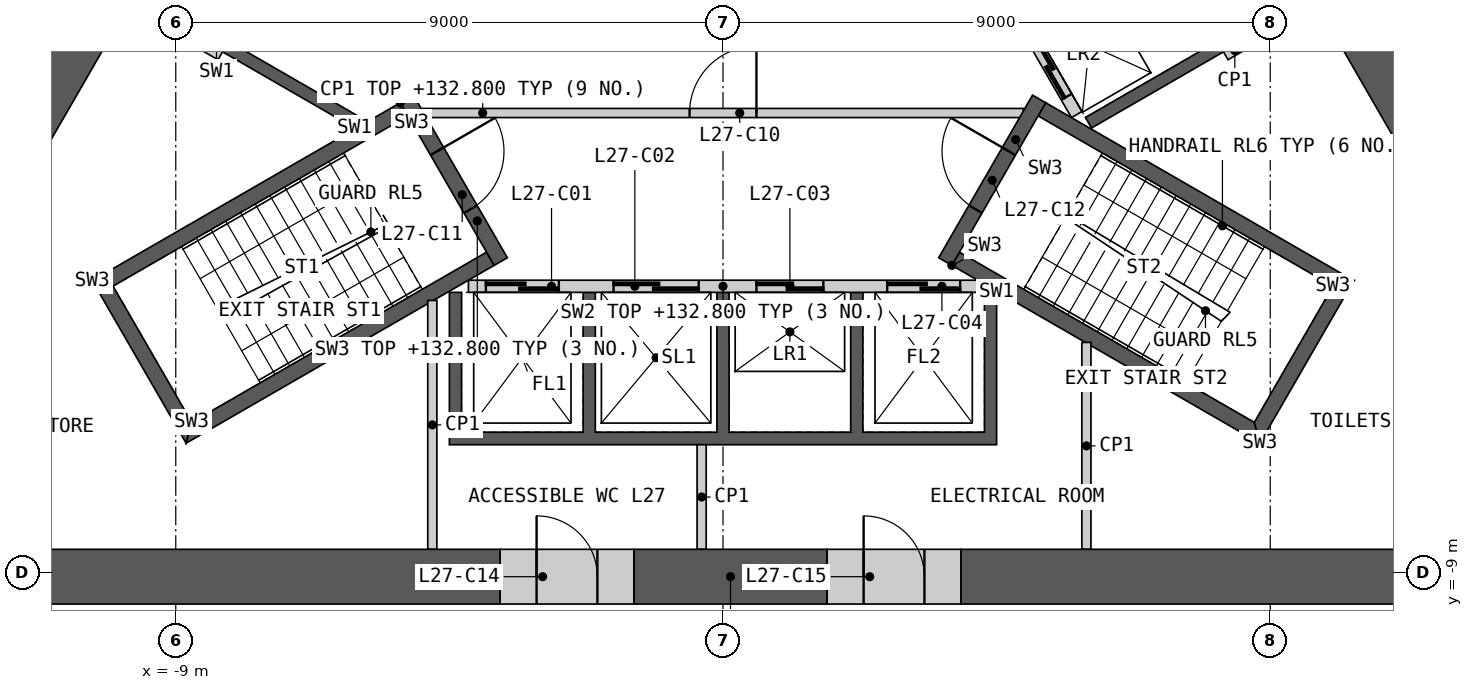
"""IFC4 building model, lengths in metres.
Left out: names, types, materials, properties, quantities, classifications, styles, units other than length and angle.
Written with IfcOpenShell. Run it as: python <this file> out.ifc"""

import sys

from ifc_helpers import new_model, si_unit, direction, frame, frame_2d, origin, place, context, subcontext, project, spatial, polyline, rectangle, outline, extrude, element, fill, save


model = new_model("IFC4")
c1 = context("Model", 3, precision=1e-05, world=origin(), true_north=direction((0.0, 1.0)))
c2 = subcontext(c1, "Body", "Model", "MODEL_VIEW")
j1 = project(units=[si_unit("LENGTHUNIT", "METRE"), si_unit("PLANEANGLEUNIT", "RADIAN")], contexts=[c1])
p1 = place(None, origin())
s1 = spatial("IfcSite", under=j1, at=p1, CompositionType="ELEMENT")
p2 = place(p1, origin())
s2 = spatial("IfcBuilding", under=s1, at=p2, CompositionType="ELEMENT")
p3 = place(p2, frame((0.0, 0.0, 129.0)))
s3 = spatial("IfcBuildingStorey", under=s2, at=p3, CompositionType="ELEMENT", Elevation=129.0)
p4 = place(p3, origin())
e1 = element("IfcWall", 1, at=p4, inside=s3, PredefinedType="SHEAR", context=c2, shape_type="SweptSolid", body=[
    extrude(outline(polyline([(4.5, -4.4), (4.5, -6.906), (-4.5, -6.906), (-4.5, -4.4), (-4.3, -4.4), (-4.3, -6.7), (-2.3, -6.7), (-2.3, -4.4), (-2.1, -4.4), (-2.1, -6.7), (-0.1, -6.7), (-0.1, -4.4), (0.1, -4.4), (0.1, -6.7), (2.1, -6.7), (2.1, -4.4), (2.3, -4.4), (2.3, -6.7), (4.3, -6.7), (4.3, -4.4), (4.5, -4.4)])), origin(), (0.0, 0.0, 1.0), 3.8),
])
p5 = place(p3, frame((-4.187, -4.3, 0.0), z_axis=(0.0, 0.0, 1.0), x_axis=(1.0, 0.0, 0.0)))
e2 = element("IfcWall", 2, at=p5, inside=s3, PredefinedType="SOLIDWALL", context=c2, shape_type="SweptSolid", body=[
    extrude(rectangle(XDim=8.373, YDim=0.2, at=frame_2d((4.187, 0.0))), origin(), (0.0, 0.0, 1.0), 3.8),
])
p6 = place(p5, frame((0.287, 0.0, 0.0)))
e3 = element("IfcOpeningElement", 3, at=p6, cuts=e2, PredefinedType="OPENING", context=c2, shape_type="SweptSolid", body=[
    extrude(rectangle(XDim=1.2, YDim=2.1, at=frame_2d((0.6, 1.05))), frame((0.0, 0.11, 0.0), z_axis=(0.0, -1.0, 0.0), x_axis=(1.0, 0.0, 0.0)), (0.0, 0.0, 1.0), 0.22),
])
p7 = place(p5, frame((2.387, 0.0, 0.0)))
e4 = element("IfcOpeningElement", 4, at=p7, cuts=e2, PredefinedType="OPENING", context=c2, shape_type="SweptSolid", body=[
    extrude(rectangle(XDim=1.4, YDim=2.1, at=frame_2d((0.7, 1.05))), frame((0.0, 0.11, 0.0), z_axis=(0.0, -1.0, 0.0), x_axis=(1.0, 0.0, 0.0)), (0.0, 0.0, 1.0), 0.22),
])
p8 = place(p5, frame((4.737, 0.0, 0.0)))
e5 = element("IfcOpeningElement", 5, at=p8, cuts=e2, PredefinedType="OPENING", context=c2, shape_type="SweptSolid", body=[
    extrude(rectangle(XDim=1.1, YDim=2.1, at=frame_2d((0.55, 1.05))), frame((0.0, 0.11, 0.0), z_axis=(0.0, -1.0, 0.0), x_axis=(1.0, 0.0, 0.0)), (0.0, 0.0, 1.0), 0.22),
])
p9 = place(p5, frame((6.887, 0.0, 0.0)))
e6 = element("IfcOpeningElement", 6, at=p9, cuts=e2, PredefinedType="OPENING", context=c2, shape_type="SweptSolid", body=[
    extrude(rectangle(XDim=1.2, YDim=2.1, at=frame_2d((0.6, 1.05))), frame((0.0, 0.11, 0.0), z_axis=(0.0, -1.0, 0.0), x_axis=(1.0, 0.0, 0.0)), (0.0, 0.0, 1.0), 0.22),
])
p10 = place(p3, origin())
e7 = element("IfcWall", 7, at=p10, inside=s3, PredefinedType="SHEAR", context=c2, shape_type="SweptSolid", body=[
    extrude(outline(polyline([(2.66, 4.192), (4.831, 5.445), (8.231, -0.444), (6.061, -1.697), (5.96, -1.524), (7.952, -0.374), (6.952, 1.358), (4.96, 0.208), (4.861, 0.381), (6.852, 1.531), (5.852, 3.263), (3.861, 2.113), (3.76, 2.287), (5.752, 3.437), (4.752, 5.169), (2.76, 4.019), (2.66, 4.192)])), origin(), (0.0, 0.0, 1.0), 3.8),
])
p11 = place(p3, frame((5.817, -1.476, 0.0), z_axis=(0.0, 0.0, 1.0), x_axis=(-0.500002616675, 0.866023893041, 0.0)))
e8 = element("IfcWall", 8, at=p11, inside=s3, PredefinedType="SOLIDWALL", context=c2, shape_type="SweptSolid", body=[
    extrude(rectangle(XDim=8.373, YDim=0.2, at=frame_2d((4.187, 0.0))), origin(), (0.0, 0.0, 1.0), 3.8),
])
p12 = place(p11, frame((0.337, 0.0, 0.0)))
e9 = element("IfcOpeningElement", 9, at=p12, cuts=e8, PredefinedType="OPENING", context=c2, shape_type="SweptSolid", body=[
    extrude(rectangle(XDim=1.1, YDim=2.1, at=frame_2d((0.55, 1.05))), frame((0.0, 0.11, 0.0), z_axis=(0.0, -1.0, 0.0), x_axis=(1.0, 0.0, 0.0)), (0.0, 0.0, 1.0), 0.22),
])
p13 = place(p11, frame((2.537, 0.0, 0.0)))
e10 = element("IfcOpeningElement", 10, at=p13, cuts=e8, PredefinedType="OPENING", context=c2, shape_type="SweptSolid", body=[
    extrude(rectangle(XDim=1.1, YDim=2.1, at=frame_2d((0.55, 1.05))), frame((0.0, 0.11, 0.0), z_axis=(0.0, -1.0, 0.0), x_axis=(1.0, 0.0, 0.0)), (0.0, 0.0, 1.0), 0.22),
])
p14 = place(p11, frame((4.737, 0.0, 0.0)))
e11 = element("IfcOpeningElement", 11, at=p14, cuts=e8, PredefinedType="OPENING", context=c2, shape_type="SweptSolid", body=[
    extrude(rectangle(XDim=1.1, YDim=2.1, at=frame_2d((0.55, 1.05))), frame((0.0, 0.11, 0.0), z_axis=(0.0, -1.0, 0.0), x_axis=(1.0, 0.0, 0.0)), (0.0, 0.0, 1.0), 0.22),
])
p15 = place(p11, frame((7.037, 0.0, 0.0)))
e12 = element("IfcOpeningElement", 12, at=p15, cuts=e8, PredefinedType="OPENING", context=c2, shape_type="SweptSolid", body=[
    extrude(rectangle(XDim=0.9, YDim=2.1, at=frame_2d((0.45, 1.05))), frame((0.0, 0.11, 0.0), z_axis=(0.0, -1.0, 0.0), x_axis=(1.0, 0.0, 0.0)), (0.0, 0.0, 1.0), 0.22),
])
p16 = place(p3, origin())
e13 = element("IfcWall", 13, at=p16, inside=s3, PredefinedType="SHEAR", context=c2, shape_type="SweptSolid", body=[
    extrude(outline(polyline([(-6.061, -1.697), (-8.231, -0.444), (-8.131, -0.271), (-5.96, -1.524), (-6.061, -1.697)])), origin(), (0.0, 0.0, 1.0), 3.8),
])
p17 = place(p3, frame((-4.941, -1.45, 0.0), z_axis=(0.0, 0.0, 1.0), x_axis=(1.0, 0.0, 0.0)))
e14 = element("IfcWall", 14, at=p17, inside=s3, PredefinedType="PARTITIONING", context=c2, shape_type="SweptSolid", body=[
    extrude(rectangle(XDim=9.882, YDim=0.15, at=frame_2d((4.941, 0.0))), origin(), (0.0, 0.0, 1.0), 3.8),
])
p18 = place(p17, frame((4.391, 0.0, 0.0)))
e15 = element("IfcOpeningElement", 15, at=p18, cuts=e14, PredefinedType="OPENING", context=c2, shape_type="SweptSolid", body=[
    extrude(rectangle(XDim=1.1, YDim=2.1, at=frame_2d((0.55, 1.05))), frame((0.0, 0.085, 0.0), z_axis=(0.0, -1.0, 0.0), x_axis=(1.0, 0.0, 0.0)), (0.0, 0.0, 1.0), 0.17),
])
p19 = place(p3, origin())
e16 = element("IfcWall", 16, at=p19, inside=s3, PredefinedType="SHEAR", context=c2, shape_type="SweptSolid", body=[
    extrude(outline(polyline([(-5.307, -1.281), (-10.374, -4.206), (-10.032, -4.298), (-5.182, -1.498), (-5.307, -1.281)])), origin(), (0.0, 0.0, 1.0), 3.8),
])
p20 = place(p3, origin())
e17 = element("IfcWall", 17, at=p20, inside=s3, PredefinedType="SHEAR", context=c2, shape_type="SweptSolid", body=[
    extrude(outline(polyline([(-10.374, -4.206), (-8.83, -6.881), (-8.738, -6.539), (-10.032, -4.298), (-10.374, -4.206)])), origin(), (0.0, 0.0, 1.0), 3.8),
])
p21 = place(p3, origin())
e18 = element("IfcWall", 18, at=p21, inside=s3, PredefinedType="SHEAR", context=c2, shape_type="SweptSolid", body=[
    extrude(outline(polyline([(-8.738, -6.539), (-8.83, -6.881), (-3.763, -3.956), (-3.888, -3.739), (-8.738, -6.539)])), origin(), (0.0, 0.0, 1.0), 3.8),
])
p22 = place(p3, frame((-5.199, -1.219, 0.0), z_axis=(0.0, 0.0, 1.0), x_axis=(0.499982516597, -0.866035497597, 0.0)))
e19 = element("IfcWall", 19, at=p22, inside=s3, PredefinedType="SHEAR", context=c2, shape_type="SweptSolid", body=[
    extrude(rectangle(XDim=3.088, YDim=0.25, at=frame_2d((1.544, 0.0))), origin(), (0.0, 0.0, 1.0), 3.8),
])
p23 = place(p22, frame((0.994, 0.0, 0.0)))
e20 = element("IfcOpeningElement", 20, at=p23, cuts=e19, PredefinedType="OPENING", context=c2, shape_type="SweptSolid", body=[
    extrude(rectangle(XDim=1.1, YDim=2.1, at=frame_2d((0.55, 1.05))), frame((0.0, 0.135, 0.0), z_axis=(0.0, -1.0, 0.0), x_axis=(1.0, 0.0, 0.0)), (0.0, 0.0, 1.0), 0.27),
])
p24 = place(p3, origin())
e21 = element("IfcWall", 21, at=p24, inside=s3, PredefinedType="SHEAR", context=c2, shape_type="SweptSolid", body=[
    extrude(outline(polyline([(3.763, -3.956), (8.83, -6.881), (8.738, -6.539), (3.888, -3.739), (3.763, -3.956)])), origin(), (0.0, 0.0, 1.0), 3.8),
])
p25 = place(p3, origin())
e22 = element("IfcWall", 22, at=p25, inside=s3, PredefinedType="SHEAR", context=c2, shape_type="SweptSolid", body=[
    extrude(outline(polyline([(8.83, -6.881), (10.374, -4.206), (10.032, -4.298), (8.738, -6.539), (8.83, -6.881)])), origin(), (0.0, 0.0, 1.0), 3.8),
])
p26 = place(p3, origin())
e23 = element("IfcWall", 23, at=p26, inside=s3, PredefinedType="SHEAR", context=c2, shape_type="SweptSolid", body=[
    extrude(outline(polyline([(10.032, -4.298), (10.374, -4.206), (5.307, -1.281), (5.182, -1.498), (10.032, -4.298)])), origin(), (0.0, 0.0, 1.0), 3.8),
])
p27 = place(p3, frame((3.655, -3.893, 0.0), z_axis=(0.0, 0.0, 1.0), x_axis=(0.499982516597, 0.866035497597, 0.0)))
e24 = element("IfcWall", 24, at=p27, inside=s3, PredefinedType="SHEAR", context=c2, shape_type="SweptSolid", body=[
    extrude(rectangle(XDim=3.088, YDim=0.25, at=frame_2d((1.544, 0.0))), origin(), (0.0, 0.0, 1.0), 3.8),
])
p28 = place(p27, frame((0.994, 0.0, 0.0)))
e25 = element("IfcOpeningElement", 25, at=p28, cuts=e24, PredefinedType="OPENING", context=c2, shape_type="SweptSolid", body=[
    extrude(rectangle(XDim=1.1, YDim=2.1, at=frame_2d((0.55, 1.05))), frame((0.0, 0.135, 0.0), z_axis=(0.0, -1.0, 0.0), x_axis=(1.0, 0.0, 0.0)), (0.0, 0.0, 1.0), 0.27),
])
for number, where, z_axis, x_axis in (
    (26, (8.268, -0.509, 0.0), (0.0, 0.0, 1.0), (0.866, 0.5, 0.0)),
    (27, (-8.268, -0.509, 0.0), (0.0, 0.0, 1.0), (-0.866, 0.5, 0.0)),
):
    element("IfcWall", number, at=place(p3, frame(where, z_axis=z_axis, x_axis=x_axis)), inside=s3, PredefinedType="PARTITIONING", context=c2, shape_type="SweptSolid", body=[
        extrude(rectangle(XDim=1.72, YDim=0.15, at=frame_2d((0.86, 0.0))), origin(), (0.0, 0.0, 1.0), 3.8),
    ])
p29 = place(p3, frame((5.977, -8.626, 0.0), z_axis=(0.0, 0.0, 1.0), x_axis=(0.0, 1.0, 0.0)))
e28 = element("IfcWall", 28, at=p29, inside=s3, PredefinedType="PARTITIONING", context=c2, shape_type="SweptSolid", body=[
    extrude(rectangle(XDim=3.403, YDim=0.15, at=frame_2d((1.701, 0.0))), origin(), (0.0, 0.0, 1.0), 3.8),
])
p30 = place(p3, frame((-0.351, -8.626, 0.0), z_axis=(0.0, 0.0, 1.0), x_axis=(0.0, 1.0, 0.0)))
e29 = element("IfcWall", 29, at=p30, inside=s3, PredefinedType="PARTITIONING", context=c2, shape_type="SweptSolid", body=[
    extrude(rectangle(XDim=1.72, YDim=0.15, at=frame_2d((0.86, 0.0))), origin(), (0.0, 0.0, 1.0), 3.8),
])
p31 = place(p3, frame((-4.781, -8.626, 0.0), z_axis=(0.0, 0.0, 1.0), x_axis=(0.0, 1.0, 0.0)))
e30 = element("IfcWall", 30, at=p31, inside=s3, PredefinedType="PARTITIONING", context=c2, shape_type="SweptSolid", body=[
    extrude(rectangle(XDim=4.093, YDim=0.15, at=frame_2d((2.047, 0.0))), origin(), (0.0, 0.0, 1.0), 3.8),
])
p32 = place(p3, frame((-14.941, -9.076, 0.0), z_axis=(0.0, 0.0, 1.0), x_axis=(1.0, 0.0, 0.0)))
e31 = element("IfcWall", 31, at=p32, inside=s3, PredefinedType="SHEAR", context=c2, shape_type="SweptSolid", body=[
    extrude(rectangle(XDim=11.275, YDim=0.9, at=frame_2d((5.638, 0.0))), origin(), (0.0, 0.0, 1.0), 3.8),
])
p33 = place(p3, frame((3.913, -9.076, 0.0), z_axis=(0.0, 0.0, 1.0), x_axis=(1.0, 0.0, 0.0)))
e32 = element("IfcWall", 32, at=p33, inside=s3, PredefinedType="SHEAR", context=c2, shape_type="SweptSolid", body=[
    extrude(rectangle(XDim=11.029, YDim=0.9, at=frame_2d((5.514, 0.0))), origin(), (0.0, 0.0, 1.0), 3.8),
])
p34 = place(p3, frame((-1.466, -9.076, 0.0), z_axis=(0.0, 0.0, 1.0), x_axis=(1.0, 0.0, 0.0)))
e33 = element("IfcWall", 33, at=p34, inside=s3, PredefinedType="SHEAR", context=c2, shape_type="SweptSolid", body=[
    extrude(rectangle(XDim=3.179, YDim=0.9, at=frame_2d((1.589, 0.0))), origin(), (0.0, 0.0, 1.0), 3.8),
])
p35 = place(p3, frame((12.208, -2.992, 0.0), z_axis=(0.0, 0.0, 1.0), x_axis=(-0.499990106751, 0.866031115579, 0.0)))
e34 = element("IfcWall", 34, at=p35, inside=s3, PredefinedType="SHEAR", context=c2, shape_type="SweptSolid", body=[
    extrude(rectangle(XDim=6.396, YDim=0.9, at=frame_2d((3.198, 0.0))), origin(), (0.0, 0.0, 1.0), 3.8),
])
p36 = place(p3, frame((-10.06, 0.728, 0.0), z_axis=(0.0, 0.0, 1.0), x_axis=(-0.499996331799, -0.866027521611, 0.0)))
e35 = element("IfcWall", 35, at=p36, inside=s3, PredefinedType="SHEAR", context=c2, shape_type="SweptSolid", body=[
    extrude(rectangle(XDim=4.295, YDim=0.9, at=frame_2d((2.148, 0.0))), origin(), (0.0, 0.0, 1.0), 3.8),
])
p37 = place(p3, frame((-3.666, -9.076, 0.0), z_axis=(0.0, 0.0, 1.0), x_axis=(1.0, 0.0, 0.0)))
e36 = element("IfcWall", 36, at=p37, inside=s3, PredefinedType="SHEAR", context=c2, shape_type="SweptSolid", body=[
    extrude(rectangle(XDim=2.2, YDim=0.9, at=frame_2d((1.1, 0.0))), origin(), (0.0, 0.0, 1.0), 3.8),
])
p38 = place(p37, frame((0.6, 0.0, 0.0)))
e37 = element("IfcOpeningElement", 37, at=p38, cuts=e36, PredefinedType="OPENING", context=c2, shape_type="SweptSolid", body=[
    extrude(rectangle(XDim=1.0, YDim=2.1, at=frame_2d((0.5, 1.05))), frame((0.0, 0.46, 0.0), z_axis=(0.0, -1.0, 0.0), x_axis=(1.0, 0.0, 0.0)), (0.0, 0.0, 1.0), 0.92),
])
p39 = place(p3, frame((1.713, -9.076, 0.0), z_axis=(0.0, 0.0, 1.0), x_axis=(1.0, 0.0, 0.0)))
e38 = element("IfcWall", 38, at=p39, inside=s3, PredefinedType="SHEAR", context=c2, shape_type="SweptSolid", body=[
    extrude(rectangle(XDim=2.2, YDim=0.9, at=frame_2d((1.1, 0.0))), origin(), (0.0, 0.0, 1.0), 3.8),
])
p40 = place(p39, frame((0.6, 0.0, 0.0)))
e39 = element("IfcOpeningElement", 39, at=p40, cuts=e38, PredefinedType="OPENING", context=c2, shape_type="SweptSolid", body=[
    extrude(rectangle(XDim=1.0, YDim=2.1, at=frame_2d((0.5, 1.05))), frame((0.0, 0.46, 0.0), z_axis=(0.0, -1.0, 0.0), x_axis=(1.0, 0.0, 0.0)), (0.0, 0.0, 1.0), 0.92),
])
p41 = place(p3, frame((10.46, 5.736, 0.0), z_axis=(0.0, 0.0, 1.0), x_axis=(0.500004141693, -0.866023012564, 0.0)))
e40 = element("IfcWall", 40, at=p41, inside=s3, PredefinedType="PARTITIONING", context=c2, shape_type="SweptSolid", body=[
    extrude(rectangle(XDim=9.803, YDim=0.2, at=frame_2d((4.902, 0.0))), origin(), (0.0, 0.0, 1.0), 3.8),
])
p42 = place(p41, frame((4.352, 0.0, 0.0)))
e41 = element("IfcOpeningElement", 41, at=p42, cuts=e40, PredefinedType="OPENING", context=c2, shape_type="SweptSolid", body=[
    extrude(rectangle(XDim=1.0, YDim=2.1, at=frame_2d((0.5, 1.05))), frame((0.0, 0.11, 0.0), z_axis=(0.0, -1.0, 0.0), x_axis=(1.0, 0.0, 0.0)), (0.0, 0.0, 1.0), 0.22),
])
p43 = place(p3, frame((-15.361, -2.754, 0.0), z_axis=(0.0, 0.0, 1.0), x_axis=(0.500004141693, 0.866023012564, 0.0)))
e42 = element("IfcWall", 42, at=p43, inside=s3, PredefinedType="PARTITIONING", context=c2, shape_type="SweptSolid", body=[
    extrude(rectangle(XDim=9.803, YDim=0.2, at=frame_2d((4.902, 0.0))), origin(), (0.0, 0.0, 1.0), 3.8),
])
p44 = place(p43, frame((4.452, 0.0, 0.0)))
e43 = element("IfcOpeningElement", 43, at=p44, cuts=e42, PredefinedType="OPENING", context=c2, shape_type="SweptSolid", body=[
    extrude(rectangle(XDim=1.0, YDim=2.1, at=frame_2d((0.5, 1.05))), frame((0.0, 0.11, 0.0), z_axis=(0.0, -1.0, 0.0), x_axis=(1.0, 0.0, 0.0)), (0.0, 0.0, 1.0), 0.22),
])
p45 = place(p6, origin())
e44 = element("IfcDoor", 44, at=p45, inside=s3, OperationType="SLIDING_TO_LEFT", PredefinedType="DOOR", context=c2, shape_type="SweptSolid", body=[
    extrude(rectangle(XDim=1.2, YDim=2.1, at=frame_2d((0.6, 1.05))), frame((0.0, 0.025, 0.0), z_axis=(0.0, -1.0, 0.0), x_axis=(1.0, 0.0, 0.0)), (0.0, 0.0, 1.0), 0.05),
])
fill(e3, e44)
p46 = place(p7, origin())
e45 = element("IfcDoor", 45, at=p46, inside=s3, OperationType="SLIDING_TO_LEFT", PredefinedType="DOOR", context=c2, shape_type="SweptSolid", body=[
    extrude(rectangle(XDim=1.4, YDim=2.1, at=frame_2d((0.7, 1.05))), frame((0.0, 0.025, 0.0), z_axis=(0.0, -1.0, 0.0), x_axis=(1.0, 0.0, 0.0)), (0.0, 0.0, 1.0), 0.05),
])
fill(e4, e45)
p47 = place(p8, origin())
e46 = element("IfcDoor", 46, at=p47, inside=s3, OperationType="SLIDING_TO_LEFT", PredefinedType="DOOR", context=c2, shape_type="SweptSolid", body=[
    extrude(rectangle(XDim=1.1, YDim=2.1, at=frame_2d((0.55, 1.05))), frame((0.0, 0.025, 0.0), z_axis=(0.0, -1.0, 0.0), x_axis=(1.0, 0.0, 0.0)), (0.0, 0.0, 1.0), 0.05),
])
fill(e5, e46)
p48 = place(p9, origin())
e47 = element("IfcDoor", 47, at=p48, inside=s3, OperationType="SLIDING_TO_LEFT", PredefinedType="DOOR", context=c2, shape_type="SweptSolid", body=[
    extrude(rectangle(XDim=1.2, YDim=2.1, at=frame_2d((0.6, 1.05))), frame((0.0, 0.025, 0.0), z_axis=(0.0, -1.0, 0.0), x_axis=(1.0, 0.0, 0.0)), (0.0, 0.0, 1.0), 0.05),
])
fill(e6, e47)
p49 = place(p12, origin())
e48 = element("IfcDoor", 48, at=p49, inside=s3, OperationType="SLIDING_TO_LEFT", PredefinedType="DOOR", context=c2, shape_type="SweptSolid", body=[
    extrude(rectangle(XDim=1.1, YDim=2.1, at=frame_2d((0.55, 1.05))), frame((0.0, 0.025, 0.0), z_axis=(0.0, -1.0, 0.0), x_axis=(1.0, 0.0, 0.0)), (0.0, 0.0, 1.0), 0.05),
])
fill(e9, e48)
p50 = place(p18, origin())
e49 = element("IfcDoor", 49, at=p50, inside=s3, OperationType="SINGLE_SWING_RIGHT", PredefinedType="DOOR", context=c2, shape_type="SweptSolid", body=[
    extrude(rectangle(XDim=1.1, YDim=2.1, at=frame_2d((0.55, 1.05))), frame((0.0, 0.025, 0.0), z_axis=(0.0, -1.0, 0.0), x_axis=(1.0, 0.0, 0.0)), (0.0, 0.0, 1.0), 0.05),
])
fill(e15, e49)
p51 = place(p23, origin())
e50 = element("IfcDoor", 50, at=p51, inside=s3, OperationType="SINGLE_SWING_LEFT", PredefinedType="DOOR", context=c2, shape_type="SweptSolid", body=[
    extrude(rectangle(XDim=1.1, YDim=2.1, at=frame_2d((0.55, 1.05))), frame((0.0, 0.025, 0.0), z_axis=(0.0, -1.0, 0.0), x_axis=(1.0, 0.0, 0.0)), (0.0, 0.0, 1.0), 0.05),
])
fill(e20, e50)
p52 = place(p28, origin())
e51 = element("IfcDoor", 51, at=p52, inside=s3, OperationType="SINGLE_SWING_RIGHT", PredefinedType="DOOR", context=c2, shape_type="SweptSolid", body=[
    extrude(rectangle(XDim=1.1, YDim=2.1, at=frame_2d((0.55, 1.05))), frame((0.0, 0.025, 0.0), z_axis=(0.0, -1.0, 0.0), x_axis=(1.0, 0.0, 0.0)), (0.0, 0.0, 1.0), 0.05),
])
fill(e25, e51)
p53 = place(p38, origin())
e52 = element("IfcDoor", 52, at=p53, inside=s3, OperationType="SINGLE_SWING_LEFT", PredefinedType="DOOR", context=c2, shape_type="SweptSolid", body=[
    extrude(rectangle(XDim=1.0, YDim=2.1, at=frame_2d((0.5, 1.05))), frame((0.0, 0.205, 0.0), z_axis=(0.0, -1.0, 0.0), x_axis=(1.0, 0.0, 0.0)), (0.0, 0.0, 1.0), 0.05),
])
fill(e37, e52)
p54 = place(p40, origin())
e53 = element("IfcDoor", 53, at=p54, inside=s3, OperationType="SINGLE_SWING_LEFT", PredefinedType="DOOR", context=c2, shape_type="SweptSolid", body=[
    extrude(rectangle(XDim=1.0, YDim=2.1, at=frame_2d((0.5, 1.05))), frame((0.0, 0.205, 0.0), z_axis=(0.0, -1.0, 0.0), x_axis=(1.0, 0.0, 0.0)), (0.0, 0.0, 1.0), 0.05),
])
fill(e39, e53)
save(model, sys.argv[1])
